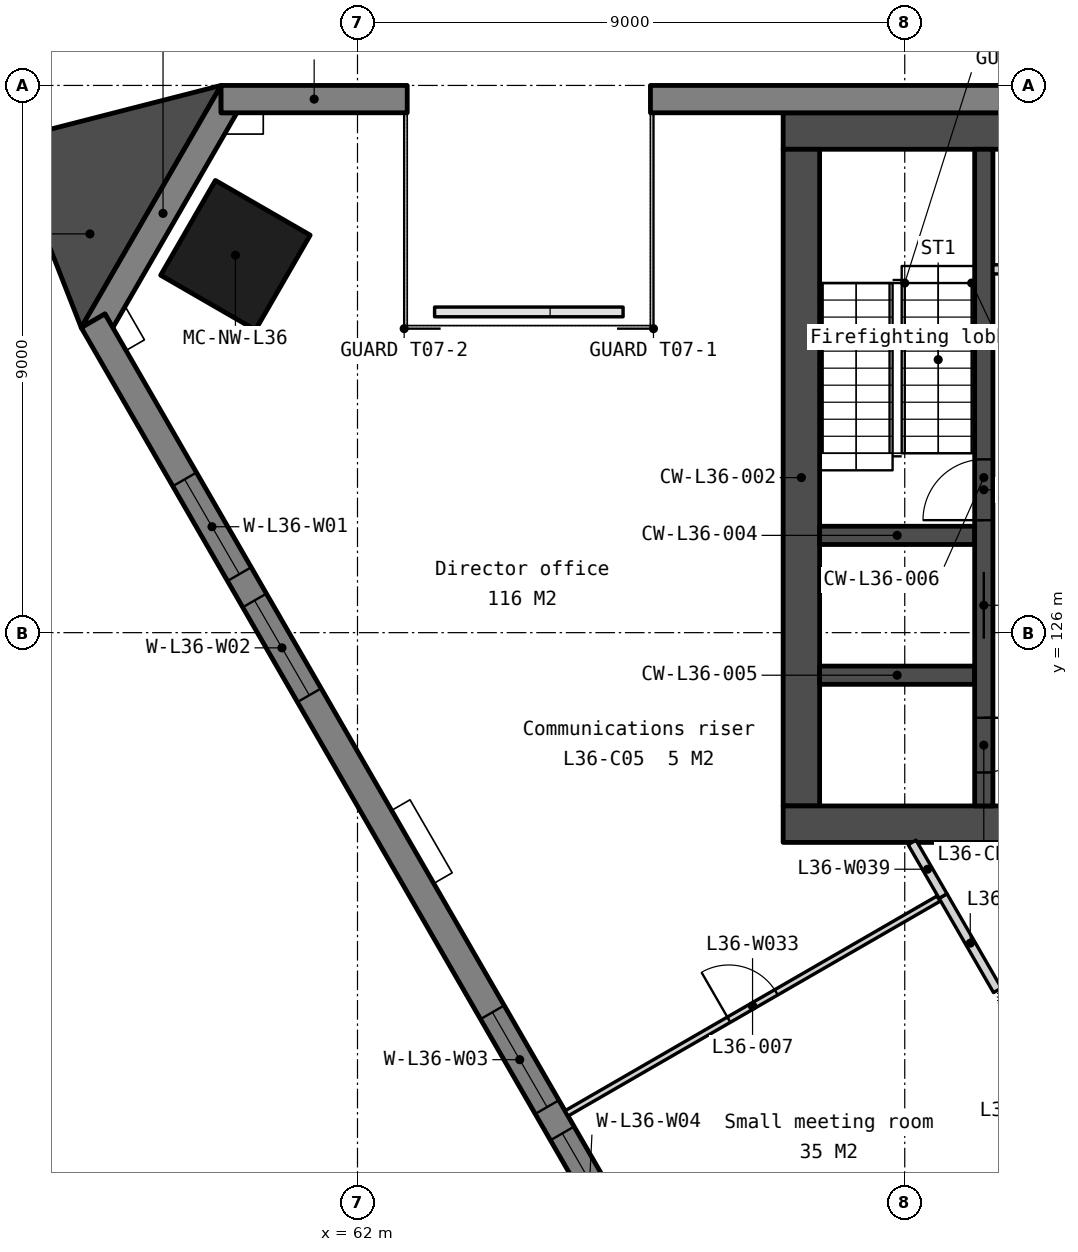
"""IFC4 building model, lengths in metres.
Left out: names, types, materials, properties, quantities, classifications, styles, units other than length and angle.
Written with IfcOpenShell. Run it as: python <this file> out.ifc"""

import sys

from ifc_helpers import new_model, si_unit, direction, frame, frame_2d, origin, origin_2d, place, context, subcontext, project, spatial, polyline, rectangle, outline, extrude, element, fill, save


model = new_model("IFC4")
c1 = context("Model", 3, precision=1e-05, world=origin(), true_north=direction((0.0, 1.0)))
c2 = subcontext(c1, "Body", "Model", "MODEL_VIEW")
j1 = project(units=[si_unit("LENGTHUNIT", "METRE"), si_unit("PLANEANGLEUNIT", "RADIAN")], contexts=[c1])
p1 = place(None, origin())
s1 = spatial("IfcSite", under=j1, at=p1, CompositionType="ELEMENT")
p2 = place(p1, origin())
s2 = spatial("IfcBuilding", under=s1, at=p2, CompositionType="ELEMENT")
p3 = place(p2, frame((0.0, 0.0, 144.2)))
s3 = spatial("IfcBuildingStorey", under=s2, at=p3, CompositionType="ELEMENT", Elevation=144.2)
p4 = place(p3, frame((59.993, 132.208, 0.0), z_axis=(0.0, 0.0, 1.0), x_axis=(-0.5, -0.866025403784, 0.0)))
e1 = element("IfcColumn", 1, at=p4, inside=s3, PredefinedType="COLUMN", context=c2, shape_type="SweptSolid", body=[
    extrude(rectangle(XDim=1.8, YDim=1.8, at=origin_2d()), origin(), (0.0, 0.0, 1.0), 3.9),
])
p5 = place(p3, frame((69.0, 134.25, 0.0), z_axis=(0.0, 0.0, 1.0), x_axis=(1.0, 0.0, 0.0)))
e2 = element("IfcWall", 2, at=p5, inside=s3, PredefinedType="SOLIDWALL", context=c2, shape_type="SweptSolid", body=[
    extrude(rectangle(XDim=22.0, YDim=0.6, at=frame_2d((11.0, 0.0))), origin(), (0.0, 0.0, 1.0), 3.75),
])
p6 = place(p3, frame((69.3, 133.95, 0.0), z_axis=(0.0, 0.0, 1.0), x_axis=(0.0, -1.0, 0.0)))
e3 = element("IfcWall", 3, at=p6, inside=s3, PredefinedType="SOLIDWALL", context=c2, shape_type="SweptSolid", body=[
    extrude(rectangle(XDim=10.8, YDim=0.6, at=frame_2d((5.4, 0.0))), origin(), (0.0, 0.0, 1.0), 3.75),
])
p7 = place(p3, frame((69.0, 122.85, 0.0), z_axis=(0.0, 0.0, 1.0), x_axis=(1.0, 0.0, 0.0)))
e4 = element("IfcWall", 4, at=p7, inside=s3, PredefinedType="SOLIDWALL", context=c2, shape_type="SweptSolid", body=[
    extrude(rectangle(XDim=22.0, YDim=0.6, at=frame_2d((11.0, 0.0))), origin(), (0.0, 0.0, 1.0), 3.75),
])
p8 = place(p7, frame((16.375, 0.0, 0.0)))
e5 = element("IfcOpeningElement", 5, at=p8, cuts=e4, PredefinedType="OPENING", context=c2, shape_type="SweptSolid", body=[
    extrude(rectangle(XDim=1.8, YDim=2.1, at=frame_2d((0.9, 1.05))), frame((0.0, 0.31, 0.0), z_axis=(0.0, -1.0, 0.0), x_axis=(1.0, 0.0, 0.0)), (0.0, 0.0, 1.0), 0.62),
])
p9 = place(p7, frame((3.825, 0.0, 0.0)))
e6 = element("IfcOpeningElement", 6, at=p9, cuts=e4, PredefinedType="OPENING", context=c2, shape_type="SweptSolid", body=[
    extrude(rectangle(XDim=1.8, YDim=2.1, at=frame_2d((0.9, 1.05))), frame((0.0, 0.31, 0.0), z_axis=(0.0, -1.0, 0.0), x_axis=(1.0, 0.0, 0.0)), (0.0, 0.0, 1.0), 0.62),
])
p10 = place(p7, frame((12.85, 0.0, 0.0)))
e7 = element("IfcOpeningElement", 7, at=p10, cuts=e4, PredefinedType="OPENING", context=c2, shape_type="SweptSolid", body=[
    extrude(rectangle(XDim=1.5, YDim=2.1, at=frame_2d((0.75, 1.05))), frame((0.0, 0.31, 0.0), z_axis=(0.0, -1.0, 0.0), x_axis=(1.0, 0.0, 0.0)), (0.0, 0.0, 1.0), 0.62),
])
for number, where, z_axis, x_axis in (
    (8, (69.6, 127.6, 0.0), (0.0, 0.0, 1.0), (1.0, 0.0, 0.0)),
    (9, (69.6, 125.3, 0.0), (0.0, 0.0, 1.0), (1.0, 0.0, 0.0)),
):
    element("IfcWall", number, at=place(p3, frame(where, z_axis=z_axis, x_axis=x_axis)), inside=s3, PredefinedType="SOLIDWALL", context=c2, shape_type="SweptSolid", body=[
        extrude(rectangle(XDim=2.55, YDim=0.3, at=frame_2d((1.275, 0.0))), origin(), (0.0, 0.0, 1.0), 3.75),
    ])
p11 = place(p3, frame((72.3, 133.95, 0.0), z_axis=(0.0, 0.0, 1.0), x_axis=(0.0, -1.0, 0.0)))
e10 = element("IfcWall", 10, at=p11, inside=s3, PredefinedType="SOLIDWALL", context=c2, shape_type="SweptSolid", body=[
    extrude(rectangle(XDim=10.8, YDim=0.3, at=frame_2d((5.4, 0.0))), origin(), (0.0, 0.0, 1.0), 3.75),
])
p12 = place(p11, frame((6.95, 0.0, 0.0)))
e11 = element("IfcOpeningElement", 11, at=p12, cuts=e10, PredefinedType="OPENING", context=c2, shape_type="SweptSolid", body=[
    extrude(rectangle(XDim=1.1, YDim=2.1, at=frame_2d((0.55, 1.05))), frame((0.0, 0.16, 0.0), z_axis=(0.0, -1.0, 0.0), x_axis=(1.0, 0.0, 0.0)), (0.0, 0.0, 1.0), 0.32),
])
p13 = place(p11, frame((9.35, 0.0, 0.0)))
e12 = element("IfcOpeningElement", 12, at=p13, cuts=e10, PredefinedType="OPENING", context=c2, shape_type="SweptSolid", body=[
    extrude(rectangle(XDim=0.9, YDim=2.1, at=frame_2d((0.45, 1.05))), frame((0.0, 0.16, 0.0), z_axis=(0.0, -1.0, 0.0), x_axis=(1.0, 0.0, 0.0)), (0.0, 0.0, 1.0), 0.32),
])
p14 = place(p11, frame((5.1, 0.0, 0.0)))
e13 = element("IfcOpeningElement", 13, at=p14, cuts=e10, PredefinedType="OPENING", context=c2, shape_type="SweptSolid", body=[
    extrude(rectangle(XDim=1.0, YDim=2.1, at=frame_2d((0.5, 1.05))), frame((0.0, 0.16, 0.0), z_axis=(0.0, -1.0, 0.0), x_axis=(1.0, 0.0, 0.0)), (0.0, 0.0, 1.0), 0.32),
])
p15 = place(p3, frame((72.45, 131.975, 0.0), z_axis=(0.0, 0.0, 1.0), x_axis=(1.0, 0.0, 0.0)))
e14 = element("IfcWall", 14, at=p15, inside=s3, PredefinedType="PARTITIONING", context=c2, shape_type="SweptSolid", body=[
    extrude(rectangle(XDim=3.45, YDim=0.15, at=frame_2d((1.725, 0.0))), origin(), (0.0, 0.0, 1.0), 3.75),
])
p16 = place(p15, frame((0.525, 0.0, 0.0)))
e15 = element("IfcOpeningElement", 15, at=p16, cuts=e14, PredefinedType="OPENING", context=c2, shape_type="SweptSolid", body=[
    extrude(rectangle(XDim=1.5, YDim=2.1, at=frame_2d((0.75, 1.05))), frame((0.0, 0.085, 0.0), z_axis=(0.0, -1.0, 0.0), x_axis=(1.0, 0.0, 0.0)), (0.0, 0.0, 1.0), 0.17),
])
p17 = place(p3, frame((0.0, 0.0, -0.15)))
e16 = element("IfcWall", 16, at=p17, inside=s3, PredefinedType="SOLIDWALL", context=c2, shape_type="SweptSolid", body=[
    extrude(outline(polyline([(59.757, 135.0), (59.757, 134.55), (60.017, 134.55), (57.977, 131.016), (57.847, 131.241), (57.457, 131.016), (59.757, 135.0)])), origin(), (0.0, 0.0, 1.0), 3.9),
])
p18 = place(p3, frame((100.243, 134.775, -0.15), z_axis=(0.0, 0.0, 1.0), x_axis=(-1.0, 0.0, 0.0)))
e17 = element("IfcWall", 17, at=p18, inside=s3, PredefinedType="SOLIDWALL", context=c2, shape_type="SweptSolid", body=[
    extrude(outline(polyline([(0.0, 0.0), (0.0, 3.9), (33.425, 3.9), (33.425, 0.0), (0.0, 0.0)])), frame((0.0, 0.225, 0.0), z_axis=(0.0, -1.0, 0.0), x_axis=(1.0, 0.0, 0.0)), (0.0, 0.0, 1.0), 0.45),
])
p19 = place(p18, frame((3.011, 0.0, 0.95)))
e18 = element("IfcOpeningElement", 18, at=p19, cuts=e17, PredefinedType="OPENING", context=c2, shape_type="SweptSolid", body=[
    extrude(rectangle(XDim=1.8, YDim=2.2, at=frame_2d((0.9, 1.1))), frame((0.0, 0.235, 0.0), z_axis=(0.0, -1.0, 0.0), x_axis=(1.0, 0.0, 0.0)), (0.0, 0.0, 1.0), 0.47),
])
p20 = place(p18, frame((5.311, 0.0, 0.95)))
e19 = element("IfcOpeningElement", 19, at=p20, cuts=e17, PredefinedType="OPENING", context=c2, shape_type="SweptSolid", body=[
    extrude(rectangle(XDim=1.8, YDim=2.2, at=frame_2d((0.9, 1.1))), frame((0.0, 0.235, 0.0), z_axis=(0.0, -1.0, 0.0), x_axis=(1.0, 0.0, 0.0)), (0.0, 0.0, 1.0), 0.47),
])
p21 = place(p18, frame((13.132, 0.0, 0.95)))
e20 = element("IfcOpeningElement", 20, at=p21, cuts=e17, PredefinedType="OPENING", context=c2, shape_type="SweptSolid", body=[
    extrude(rectangle(XDim=1.8, YDim=2.2, at=frame_2d((0.9, 1.1))), frame((0.0, 0.235, 0.0), z_axis=(0.0, -1.0, 0.0), x_axis=(1.0, 0.0, 0.0)), (0.0, 0.0, 1.0), 0.47),
])
p22 = place(p18, frame((15.432, 0.0, 0.95)))
e21 = element("IfcOpeningElement", 21, at=p22, cuts=e17, PredefinedType="OPENING", context=c2, shape_type="SweptSolid", body=[
    extrude(rectangle(XDim=1.8, YDim=2.2, at=frame_2d((0.9, 1.1))), frame((0.0, 0.235, 0.0), z_axis=(0.0, -1.0, 0.0), x_axis=(1.0, 0.0, 0.0)), (0.0, 0.0, 1.0), 0.47),
])
p23 = place(p18, frame((23.254, 0.0, 0.95)))
e22 = element("IfcOpeningElement", 22, at=p23, cuts=e17, PredefinedType="OPENING", context=c2, shape_type="SweptSolid", body=[
    extrude(rectangle(XDim=1.8, YDim=2.2, at=frame_2d((0.9, 1.1))), frame((0.0, 0.235, 0.0), z_axis=(0.0, -1.0, 0.0), x_axis=(1.0, 0.0, 0.0)), (0.0, 0.0, 1.0), 0.47),
])
p24 = place(p18, frame((25.554, 0.0, 0.95)))
e23 = element("IfcOpeningElement", 23, at=p24, cuts=e17, PredefinedType="OPENING", context=c2, shape_type="SweptSolid", body=[
    extrude(rectangle(XDim=1.8, YDim=2.2, at=frame_2d((0.9, 1.1))), frame((0.0, 0.235, 0.0), z_axis=(0.0, -1.0, 0.0), x_axis=(1.0, 0.0, 0.0)), (0.0, 0.0, 1.0), 0.47),
])
p25 = place(p3, frame((62.818, 134.775, -0.15), z_axis=(0.0, 0.0, 1.0), x_axis=(-1.0, 0.0, 0.0)))
e24 = element("IfcWall", 24, at=p25, inside=s3, PredefinedType="SOLIDWALL", context=c2, shape_type="SweptSolid", body=[
    extrude(outline(polyline([(3.061, 3.9), (3.061, 0.0), (0.0, 0.0), (0.0, 3.9), (3.061, 3.9)])), frame((0.0, 0.225, 0.0), z_axis=(0.0, -1.0, 0.0), x_axis=(1.0, 0.0, 0.0)), (0.0, 0.0, 1.0), 0.45),
])
p26 = place(p3, frame((57.652, 131.129, -0.15), z_axis=(0.0, 0.0, 1.0), x_axis=(0.499997369791, -0.866026922331, 0.0)))
e25 = element("IfcWall", 25, at=p26, inside=s3, PredefinedType="SOLIDWALL", context=c2, shape_type="SweptSolid", body=[
    extrude(outline(polyline([(40.486, 0.0), (40.486, 3.9), (0.0, 3.9), (0.0, 0.0), (40.486, 0.0)])), frame((0.0, 0.225, 0.0), z_axis=(0.0, -1.0, 0.0), x_axis=(1.0, 0.0, 0.0)), (0.0, 0.0, 1.0), 0.45),
])
p27 = place(p26, frame((3.011, 0.0, 0.95)))
e26 = element("IfcOpeningElement", 26, at=p27, cuts=e25, PredefinedType="OPENING", context=c2, shape_type="SweptSolid", body=[
    extrude(rectangle(XDim=1.8, YDim=2.2, at=frame_2d((0.9, 1.1))), frame((0.0, 0.235, 0.0), z_axis=(0.0, -1.0, 0.0), x_axis=(1.0, 0.0, 0.0)), (0.0, 0.0, 1.0), 0.47),
])
p28 = place(p26, frame((5.311, 0.0, 0.95)))
e27 = element("IfcOpeningElement", 27, at=p28, cuts=e25, PredefinedType="OPENING", context=c2, shape_type="SweptSolid", body=[
    extrude(rectangle(XDim=1.8, YDim=2.2, at=frame_2d((0.9, 1.1))), frame((0.0, 0.235, 0.0), z_axis=(0.0, -1.0, 0.0), x_axis=(1.0, 0.0, 0.0)), (0.0, 0.0, 1.0), 0.47),
])
p29 = place(p26, frame((13.132, 0.0, 0.95)))
e28 = element("IfcOpeningElement", 28, at=p29, cuts=e25, PredefinedType="OPENING", context=c2, shape_type="SweptSolid", body=[
    extrude(rectangle(XDim=1.8, YDim=2.2, at=frame_2d((0.9, 1.1))), frame((0.0, 0.235, 0.0), z_axis=(0.0, -1.0, 0.0), x_axis=(1.0, 0.0, 0.0)), (0.0, 0.0, 1.0), 0.47),
])
p30 = place(p26, frame((15.432, 0.0, 0.95)))
e29 = element("IfcOpeningElement", 29, at=p30, cuts=e25, PredefinedType="OPENING", context=c2, shape_type="SweptSolid", body=[
    extrude(rectangle(XDim=1.8, YDim=2.2, at=frame_2d((0.9, 1.1))), frame((0.0, 0.235, 0.0), z_axis=(0.0, -1.0, 0.0), x_axis=(1.0, 0.0, 0.0)), (0.0, 0.0, 1.0), 0.47),
])
p31 = place(p26, frame((23.254, 0.0, 0.95)))
e30 = element("IfcOpeningElement", 30, at=p31, cuts=e25, PredefinedType="OPENING", context=c2, shape_type="SweptSolid", body=[
    extrude(rectangle(XDim=1.8, YDim=2.2, at=frame_2d((0.9, 1.1))), frame((0.0, 0.235, 0.0), z_axis=(0.0, -1.0, 0.0), x_axis=(1.0, 0.0, 0.0)), (0.0, 0.0, 1.0), 0.47),
])
p32 = place(p26, frame((25.554, 0.0, 0.95)))
e31 = element("IfcOpeningElement", 31, at=p32, cuts=e25, PredefinedType="OPENING", context=c2, shape_type="SweptSolid", body=[
    extrude(rectangle(XDim=1.8, YDim=2.2, at=frame_2d((0.9, 1.1))), frame((0.0, 0.235, 0.0), z_axis=(0.0, -1.0, 0.0), x_axis=(1.0, 0.0, 0.0)), (0.0, 0.0, 1.0), 0.47),
])
p33 = place(p26, frame((33.375, 0.0, 0.95)))
e32 = element("IfcOpeningElement", 32, at=p33, cuts=e25, PredefinedType="OPENING", context=c2, shape_type="SweptSolid", body=[
    extrude(rectangle(XDim=1.8, YDim=2.2, at=frame_2d((0.9, 1.1))), frame((0.0, 0.235, 0.0), z_axis=(0.0, -1.0, 0.0), x_axis=(1.0, 0.0, 0.0)), (0.0, 0.0, 1.0), 0.47),
])
p34 = place(p26, frame((35.675, 0.0, 0.95)))
e33 = element("IfcOpeningElement", 33, at=p34, cuts=e25, PredefinedType="OPENING", context=c2, shape_type="SweptSolid", body=[
    extrude(rectangle(XDim=1.8, YDim=2.2, at=frame_2d((0.9, 1.1))), frame((0.0, 0.235, 0.0), z_axis=(0.0, -1.0, 0.0), x_axis=(1.0, 0.0, 0.0)), (0.0, 0.0, 1.0), 0.47),
])
p35 = place(p3, frame((0.0, 0.0, -0.15)))
e34 = element("IfcWall", 34, at=p35, inside=s3, PredefinedType="SOLIDWALL", context=c2, shape_type="SweptSolid", body=[
    extrude(outline(polyline([(59.757, 135.0), (56.248, 134.1), (57.457, 131.016), (59.757, 135.0)])), origin(), (0.0, 0.0, 1.0), 3.9),
])
p36 = place(p3, frame((67.968, 113.71, 0.0), z_axis=(0.0, 0.0, 1.0), x_axis=(0.866025031136, 0.500000645445, 0.0)))
e35 = element("IfcWall", 35, at=p36, inside=s3, PredefinedType="PARTITIONING", context=c2, shape_type="SweptSolid", body=[
    extrude(rectangle(XDim=7.065, YDim=0.2, at=frame_2d((3.532, 0.0))), origin(), (0.0, 0.0, 1.0), 3.75),
])
p37 = place(p3, frame((65.438, 118.093, 0.0), z_axis=(0.0, 0.0, 1.0), x_axis=(0.866025031136, 0.500000645445, 0.0)))
e36 = element("IfcWall", 36, at=p37, inside=s3, PredefinedType="PARTITIONING", context=c2, shape_type="SweptSolid", body=[
    extrude(rectangle(XDim=7.065, YDim=0.1, at=frame_2d((3.532, 0.0))), origin(), (0.0, 0.0, 1.0), 3.75),
])
p38 = place(p37, frame((3.083, 0.0, 0.0)))
e37 = element("IfcOpeningElement", 37, at=p38, cuts=e36, PredefinedType="OPENING", context=c2, shape_type="SweptSolid", body=[
    extrude(rectangle(XDim=0.9, YDim=2.1, at=frame_2d((0.45, 1.05))), frame((0.0, 0.06, 0.0), z_axis=(0.0, -1.0, 0.0), x_axis=(1.0, 0.0, 0.0)), (0.0, 0.0, 1.0), 0.12),
])
p39 = place(p3, frame((71.63, 121.668, 0.0), z_axis=(0.0, 0.0, 1.0), x_axis=(0.499982180423, -0.866035691677, 0.0)))
e38 = element("IfcWall", 38, at=p39, inside=s3, PredefinedType="PARTITIONING", context=c2, shape_type="SweptSolid", body=[
    extrude(rectangle(XDim=1.79, YDim=0.15, at=frame_2d((0.895, 0.0))), origin(), (0.0, 0.0, 1.0), 3.75),
])
p40 = place(p3, frame((71.121, 122.55, 0.0), z_axis=(0.0, 0.0, 1.0), x_axis=(0.500006018292, -0.866021929094, 0.0)))
e39 = element("IfcWall", 39, at=p40, inside=s3, PredefinedType="PARTITIONING", context=c2, shape_type="SweptSolid", body=[
    extrude(rectangle(XDim=1.019, YDim=0.15, at=frame_2d((0.509, 0.0))), origin(), (0.0, 0.0, 1.0), 3.75),
])
p41 = place(p12, origin())
e40 = element("IfcDoor", 40, at=p41, inside=s3, OperationType="SLIDING_TO_LEFT", PredefinedType="DOOR", context=c2, shape_type="SweptSolid", body=[
    extrude(rectangle(XDim=1.1, YDim=2.1, at=frame_2d((0.55, 1.05))), frame((0.0, 0.025, 0.0), z_axis=(0.0, -1.0, 0.0), x_axis=(1.0, 0.0, 0.0)), (0.0, 0.0, 1.0), 0.05),
])
fill(e11, e40)
p42 = place(p13, origin())
e41 = element("IfcDoor", 41, at=p42, inside=s3, OperationType="SINGLE_SWING_LEFT", PredefinedType="DOOR", context=c2, shape_type="SweptSolid", body=[
    extrude(rectangle(XDim=0.9, YDim=2.1, at=frame_2d((0.45, 1.05))), frame((0.0, 0.025, 0.0), z_axis=(0.0, -1.0, 0.0), x_axis=(1.0, 0.0, 0.0)), (0.0, 0.0, 1.0), 0.05),
])
fill(e12, e41)
p43 = place(p14, origin())
e42 = element("IfcDoor", 42, at=p43, inside=s3, OperationType="SINGLE_SWING_RIGHT", PredefinedType="DOOR", context=c2, shape_type="SweptSolid", body=[
    extrude(rectangle(XDim=1.0, YDim=2.1, at=frame_2d((0.5, 1.05))), frame((0.0, 0.025, 0.0), z_axis=(0.0, -1.0, 0.0), x_axis=(1.0, 0.0, 0.0)), (0.0, 0.0, 1.0), 0.05),
])
fill(e13, e42)
p44 = place(p27, origin())
e43 = element("IfcWindow", 43, at=p44, inside=s3, PartitioningType="SINGLE_PANEL", PredefinedType="WINDOW", context=c2, shape_type="SweptSolid", body=[
    extrude(rectangle(XDim=1.8, YDim=2.2, at=frame_2d((0.9, 1.1))), frame((0.0, 0.03, 0.0), z_axis=(0.0, -1.0, 0.0), x_axis=(1.0, 0.0, 0.0)), (0.0, 0.0, 1.0), 0.06),
])
fill(e26, e43)
p45 = place(p28, origin())
e44 = element("IfcWindow", 44, at=p45, inside=s3, PartitioningType="SINGLE_PANEL", PredefinedType="WINDOW", context=c2, shape_type="SweptSolid", body=[
    extrude(rectangle(XDim=1.8, YDim=2.2, at=frame_2d((0.9, 1.1))), frame((0.0, 0.03, 0.0), z_axis=(0.0, -1.0, 0.0), x_axis=(1.0, 0.0, 0.0)), (0.0, 0.0, 1.0), 0.06),
])
fill(e27, e44)
p46 = place(p29, origin())
e45 = element("IfcWindow", 45, at=p46, inside=s3, PartitioningType="SINGLE_PANEL", PredefinedType="WINDOW", context=c2, shape_type="SweptSolid", body=[
    extrude(rectangle(XDim=1.8, YDim=2.2, at=frame_2d((0.9, 1.1))), frame((0.0, 0.03, 0.0), z_axis=(0.0, -1.0, 0.0), x_axis=(1.0, 0.0, 0.0)), (0.0, 0.0, 1.0), 0.06),
])
fill(e28, e45)
p47 = place(p30, origin())
e46 = element("IfcWindow", 46, at=p47, inside=s3, PartitioningType="SINGLE_PANEL", PredefinedType="WINDOW", context=c2, shape_type="SweptSolid", body=[
    extrude(rectangle(XDim=1.8, YDim=2.2, at=frame_2d((0.9, 1.1))), frame((0.0, 0.03, 0.0), z_axis=(0.0, -1.0, 0.0), x_axis=(1.0, 0.0, 0.0)), (0.0, 0.0, 1.0), 0.06),
])
fill(e29, e46)
p48 = place(p38, origin())
e47 = element("IfcDoor", 47, at=p48, inside=s3, OperationType="SINGLE_SWING_LEFT", PredefinedType="DOOR", context=c2, shape_type="SweptSolid", body=[
    extrude(rectangle(XDim=0.9, YDim=2.1, at=frame_2d((0.45, 1.05))), frame((0.0, 0.025, 0.0), z_axis=(0.0, -1.0, 0.0), x_axis=(1.0, 0.0, 0.0)), (0.0, 0.0, 1.0), 0.05),
])
fill(e37, e47)
save(model, sys.argv[1])
